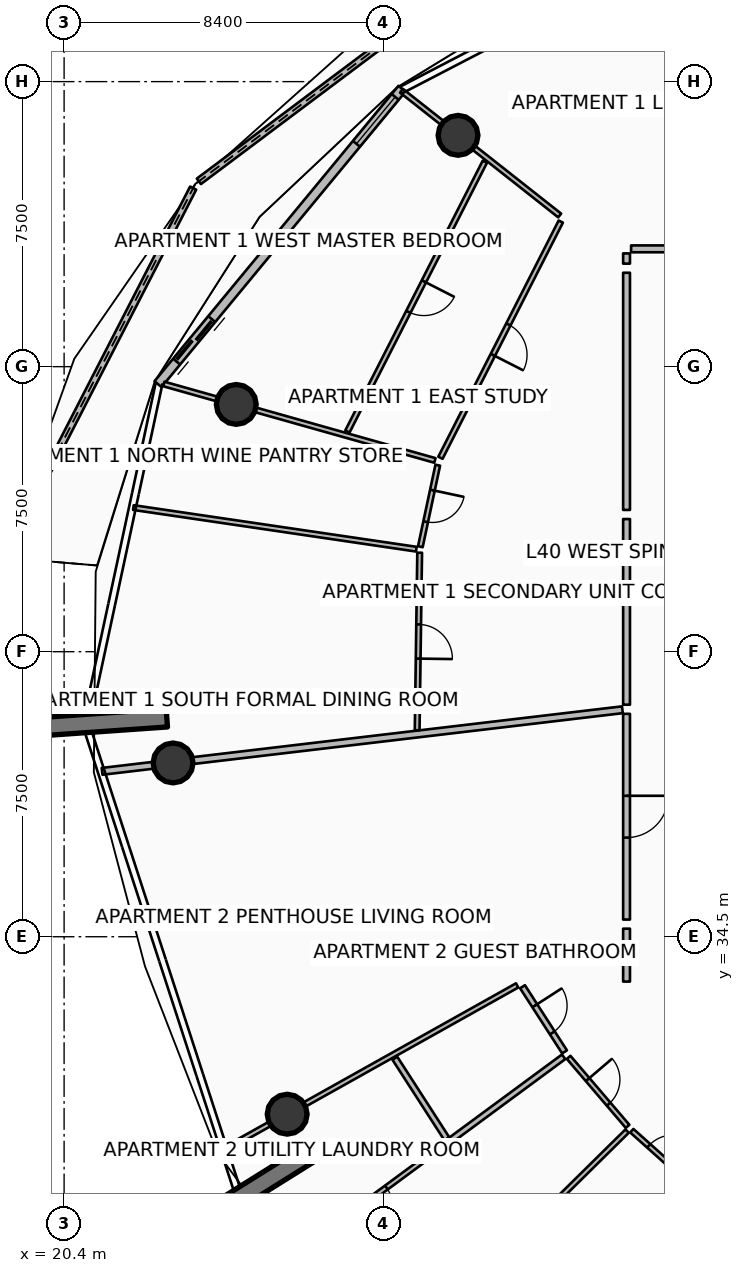
"""IFC4 building model, lengths in metres.
Left out: names, types, materials, properties, quantities, classifications, styles, units other than length and angle.
Written with IfcOpenShell. Run it as: python <this file> out.ifc"""

import sys

from ifc_helpers import new_model, si_unit, direction, frame, frame_2d, origin, origin_2d, place, context, subcontext, project, spatial, polyline, rectangle, circle, outline, extrude, element, fill, save


model = new_model("IFC4")
c1 = context("Model", 3, precision=1e-05, world=origin(), true_north=direction((0.0, 1.0)))
c2 = subcontext(c1, "Body", "Model", "MODEL_VIEW")
j1 = project(units=[si_unit("LENGTHUNIT", "METRE"), si_unit("PLANEANGLEUNIT", "RADIAN")], contexts=[c1])
p1 = place(None, origin())
s1 = spatial("IfcSite", under=j1, at=p1, CompositionType="ELEMENT")
p2 = place(p1, origin())
s2 = spatial("IfcBuilding", under=s1, at=p2, CompositionType="ELEMENT")
p3 = place(p2, frame((0.0, 0.0, 161.55)))
s3 = spatial("IfcBuildingStorey", under=s2, at=p3, CompositionType="ELEMENT", Elevation=161.55)
for number, where, z_axis, x_axis in (
    (1, (23.103, 40.259, 0.0), (0.0, 0.0, 1.0), (-0.998, -0.07, 0.0)),
    (2, (26.835, 28.774, 0.0), (0.0, 0.0, 1.0), (-0.848, -0.53, 0.0)),
):
    element("IfcWall", number, at=place(p3, frame(where, z_axis=z_axis, x_axis=x_axis)), inside=s3, PredefinedType="SOLIDWALL", context=c2, shape_type="SweptSolid", body=[
        extrude(rectangle(XDim=3.5, YDim=0.48, at=frame_2d((1.75, 0.0))), origin(), (0.0, 0.0, 1.0), 3.75),
    ])
for number, where, z_axis, x_axis in (
    (3, (30.766, 55.586, 0.0), (0.0, 0.0, 1.0), (1.0, 0.0, 0.0)),
    (4, (24.93, 48.506, 0.0), (0.0, 0.0, 1.0), (1.0, 0.0, 0.0)),
    (5, (23.267, 39.073, 0.0), (0.0, 0.0, 1.0), (1.0, 0.0, 0.0)),
    (6, (26.27, 29.831, 0.0), (0.0, 0.0, 1.0), (1.0, 0.0, 0.0)),
):
    element("IfcColumn", number, at=place(p3, frame(where, z_axis=z_axis, x_axis=x_axis)), inside=s3, PredefinedType="COLUMN", context=c2, shape_type="SweptSolid", body=[
        extrude(circle(Radius=0.525, at=origin_2d()), origin(), (0.0, 0.0, 1.0), 3.5),
    ])
p4 = place(p3, frame((32.046, 60.45, 0.0), z_axis=(0.0, 0.0, 1.0), x_axis=(-0.800078127259, -0.599895816189, 0.0)))
e7 = element("IfcWall", 7, at=p4, inside=s3, PredefinedType="PARAPET", context=c2, shape_type="SweptSolid", body=[
    extrude(outline(polyline([(0.0, 0.0), (10.124, 0.0), (10.124, 1.348), (5.062, 1.182), (0.0, 1.12), (0.0, 0.0)])), frame((0.0, 0.09, 0.0), z_axis=(0.0, -1.0, 0.0), x_axis=(1.0, 0.0, 0.0)), (0.0, 0.0, 1.0), 0.18),
])
p5 = place(p3, frame((23.796, 54.198, 0.0), z_axis=(0.0, 0.0, 1.0), x_axis=(-0.457378798552, -0.88927196888, 0.0)))
e8 = element("IfcWall", 8, at=p5, inside=s3, PredefinedType="PARAPET", context=c2, shape_type="SweptSolid", body=[
    extrude(outline(polyline([(0.0, 0.0), (10.93, 0.0), (10.93, 1.747), (5.465, 1.562), (0.0, 1.348), (0.0, 0.0)])), frame((0.0, 0.09, 0.0), z_axis=(0.0, -1.0, 0.0), x_axis=(1.0, 0.0, 0.0)), (0.0, 0.0, 1.0), 0.18),
])
p6 = place(p3, frame((29.291, 56.813, 0.0), z_axis=(0.0, 0.0, 1.0), x_axis=(-0.636771922292, -0.77105221547, 0.0)))
e9 = element("IfcWall", 9, at=p6, inside=s3, PredefinedType="SOLIDWALL", context=c2, shape_type="SweptSolid", body=[
    extrude(rectangle(XDim=10.082, YDim=0.24, at=frame_2d((5.041, 0.0))), origin(), (0.0, 0.0, 1.0), 2.45),
])
p7 = place(p6, frame((7.862, 0.0, 0.0)))
e10 = element("IfcOpeningElement", 10, at=p7, cuts=e9, PredefinedType="OPENING", context=c2, shape_type="SweptSolid", body=[
    extrude(rectangle(XDim=1.45, YDim=2.15, at=frame_2d((0.725, 1.075))), frame((0.0, 0.13, 0.0), z_axis=(0.0, -1.0, 0.0), x_axis=(1.0, 0.0, 0.0)), (0.0, 0.0, 1.0), 0.26),
])
p8 = place(p6, frame((0.28, 0.0, 0.65)))
e11 = element("IfcOpeningElement", 11, at=p8, cuts=e9, PredefinedType="OPENING", context=c2, shape_type="SweptSolid", body=[
    extrude(rectangle(XDim=1.6, YDim=1.5, at=frame_2d((0.8, 0.75))), frame((0.0, 0.13, 0.0), z_axis=(0.0, -1.0, 0.0), x_axis=(1.0, 0.0, 0.0)), (0.0, 0.0, 1.0), 0.26),
])
p9 = place(p3, frame((35.091, 40.472, 0.0), z_axis=(0.0, 0.0, 1.0), x_axis=(-0.993067434621, -0.11754603479, 0.0)))
e12 = element("IfcWall", 12, at=p9, inside=s3, PredefinedType="PARTITIONING", context=c2, shape_type="SweptSolid", body=[
    extrude(rectangle(XDim=13.787, YDim=0.18, at=frame_2d((6.894, 0.0))), origin(), (0.0, 0.0, 1.0), 2.94),
])
p10 = place(p3, frame((41.944, 52.6, 0.0), z_axis=(0.0, 0.0, 1.0), x_axis=(-1.0, 0.0, 0.0)))
e13 = element("IfcWall", 13, at=p10, inside=s3, PredefinedType="PARTITIONING", context=c2, shape_type="SweptSolid", body=[
    extrude(rectangle(XDim=6.624, YDim=0.18, at=frame_2d((3.312, 0.0))), origin(), (0.0, 0.0, 1.0), 2.94),
])
p11 = place(p10, frame((2.762, 0.0, 0.0)))
e14 = element("IfcOpeningElement", 14, at=p11, cuts=e13, PredefinedType="OPENING", context=c2, shape_type="SweptSolid", body=[
    extrude(rectangle(XDim=1.1, YDim=2.1, at=frame_2d((0.55, 1.05))), frame((0.0, 0.1, 0.0), z_axis=(0.0, -1.0, 0.0), x_axis=(1.0, 0.0, 0.0)), (0.0, 0.0, 1.0), 0.2),
])
p12 = place(p3, frame((35.2, 52.48, 0.0), z_axis=(0.0, 0.0, 1.0), x_axis=(0.0, -1.0, 0.0)))
e15 = element("IfcWall", 15, at=p12, inside=s3, PredefinedType="PARTITIONING", context=c2, shape_type="SweptSolid", body=[
    extrude(rectangle(XDim=0.269, YDim=0.18, at=frame_2d((0.135, 0.0))), origin(), (0.0, 0.0, 1.0), 2.94),
])
p13 = place(p3, frame((35.2, 51.971, 0.0), z_axis=(0.0, 0.0, 1.0), x_axis=(0.0, -1.0, 0.0)))
e16 = element("IfcWall", 16, at=p13, inside=s3, PredefinedType="PARTITIONING", context=c2, shape_type="SweptSolid", body=[
    extrude(rectangle(XDim=6.241, YDim=0.18, at=frame_2d((3.12, 0.0))), origin(), (0.0, 0.0, 1.0), 2.94),
])
p14 = place(p3, frame((33.441, 53.477, 0.0), z_axis=(0.0, 0.0, 1.0), x_axis=(-0.785319981095, 0.619090080112, 0.0)))
e17 = element("IfcWall", 17, at=p14, inside=s3, PredefinedType="PARTITIONING", context=c2, shape_type="SweptSolid", body=[
    extrude(rectangle(XDim=5.301, YDim=0.125, at=frame_2d((2.65, 0.0))), origin(), (0.0, 0.0, 1.0), 2.94),
])
p15 = place(p3, frame((33.469, 53.317, 0.0), z_axis=(0.0, 0.0, 1.0), x_axis=(-0.453977694262, -0.891013048789, 0.0)))
e18 = element("IfcWall", 18, at=p15, inside=s3, PredefinedType="PARTITIONING", context=c2, shape_type="SweptSolid", body=[
    extrude(rectangle(XDim=6.974, YDim=0.125, at=frame_2d((3.487, 0.0))), origin(), (0.0, 0.0, 1.0), 2.94),
])
p16 = place(p15, frame((3.037, 0.0, 0.0)))
e19 = element("IfcOpeningElement", 19, at=p16, cuts=e18, PredefinedType="OPENING", context=c2, shape_type="SweptSolid", body=[
    extrude(rectangle(XDim=0.9, YDim=2.08, at=frame_2d((0.45, 1.04))), frame((0.0, 0.073, 0.0), z_axis=(0.0, -1.0, 0.0), x_axis=(1.0, 0.0, 0.0)), (0.0, 0.0, 1.0), 0.145),
])
p17 = place(p3, frame((31.472, 54.892, 0.0), z_axis=(0.0, 0.0, 1.0), x_axis=(-0.453991424948, -0.89100605277, 0.0)))
e20 = element("IfcWall", 20, at=p17, inside=s3, PredefinedType="PARTITIONING", context=c2, shape_type="SweptSolid", body=[
    extrude(rectangle(XDim=7.967, YDim=0.125, at=frame_2d((3.983, 0.0))), origin(), (0.0, 0.0, 1.0), 2.94),
])
p18 = place(p17, frame((3.534, 0.0, 0.0)))
e21 = element("IfcOpeningElement", 21, at=p18, cuts=e20, PredefinedType="OPENING", context=c2, shape_type="SweptSolid", body=[
    extrude(rectangle(XDim=0.9, YDim=2.08, at=frame_2d((0.45, 1.04))), frame((0.0, 0.073, 0.0), z_axis=(0.0, -1.0, 0.0), x_axis=(1.0, 0.0, 0.0)), (0.0, 0.0, 1.0), 0.145),
])
p19 = place(p3, frame((35.2, 45.49, 0.0), z_axis=(0.0, 0.0, 1.0), x_axis=(0.0, -1.0, 0.0)))
e22 = element("IfcWall", 22, at=p19, inside=s3, PredefinedType="PARTITIONING", context=c2, shape_type="SweptSolid", body=[
    extrude(rectangle(XDim=4.885, YDim=0.18, at=frame_2d((2.442, 0.0))), origin(), (0.0, 0.0, 1.0), 2.94),
])
p20 = place(p3, frame((30.157, 47.032, 0.0), z_axis=(0.0, 0.0, 1.0), x_axis=(-0.962456736489, 0.271435131084, 0.0)))
e23 = element("IfcWall", 23, at=p20, inside=s3, PredefinedType="PARTITIONING", context=c2, shape_type="SweptSolid", body=[
    extrude(rectangle(XDim=7.412, YDim=0.125, at=frame_2d((3.706, 0.0))), origin(), (0.0, 0.0, 1.0), 2.94),
])
p21 = place(p3, frame((29.668, 44.697, 0.0), z_axis=(0.0, 0.0, 1.0), x_axis=(-0.989352403942, 0.145539756815, 0.0)))
e24 = element("IfcWall", 24, at=p21, inside=s3, PredefinedType="PARTITIONING", context=c2, shape_type="SweptSolid", body=[
    extrude(rectangle(XDim=7.525, YDim=0.125, at=frame_2d((3.763, 0.0))), origin(), (0.0, 0.0, 1.0), 2.94),
])
p22 = place(p3, frame((30.232, 46.907, 0.0), z_axis=(0.0, 0.0, 1.0), x_axis=(-0.208920938613, -0.977932534181, 0.0)))
e25 = element("IfcWall", 25, at=p22, inside=s3, PredefinedType="PARTITIONING", context=c2, shape_type="SweptSolid", body=[
    extrude(rectangle(XDim=2.193, YDim=0.125, at=frame_2d((1.097, 0.0))), origin(), (0.0, 0.0, 1.0), 2.94),
])
p23 = place(p22, frame((0.672, 0.0, 0.0)))
e26 = element("IfcOpeningElement", 26, at=p23, cuts=e25, PredefinedType="OPENING", context=c2, shape_type="SweptSolid", body=[
    extrude(rectangle(XDim=0.85, YDim=2.06, at=frame_2d((0.425, 1.03))), frame((0.0, 0.073, 0.0), z_axis=(0.0, -1.0, 0.0), x_axis=(1.0, 0.0, 0.0)), (0.0, 0.0, 1.0), 0.145),
])
p24 = place(p3, frame((29.756, 44.604, 0.0), z_axis=(0.0, 0.0, 1.0), x_axis=(-0.014161849223, -0.999899715985, 0.0)))
e27 = element("IfcWall", 27, at=p24, inside=s3, PredefinedType="PARTITIONING", context=c2, shape_type="SweptSolid", body=[
    extrude(rectangle(XDim=4.672, YDim=0.125, at=frame_2d((2.336, 0.0))), origin(), (0.0, 0.0, 1.0), 2.94),
])
p25 = place(p24, frame((1.886, 0.0, 0.0)))
e28 = element("IfcOpeningElement", 28, at=p25, cuts=e27, PredefinedType="OPENING", context=c2, shape_type="SweptSolid", body=[
    extrude(rectangle(XDim=0.9, YDim=2.08, at=frame_2d((0.45, 1.04))), frame((0.0, 0.073, 0.0), z_axis=(0.0, -1.0, 0.0), x_axis=(1.0, 0.0, 0.0)), (0.0, 0.0, 1.0), 0.145),
])
p26 = place(p3, frame((35.2, 40.365, 0.0), z_axis=(0.0, 0.0, 1.0), x_axis=(0.0, -1.0, 0.0)))
e29 = element("IfcWall", 29, at=p26, inside=s3, PredefinedType="PARTITIONING", context=c2, shape_type="SweptSolid", body=[
    extrude(rectangle(XDim=5.413, YDim=0.18, at=frame_2d((2.707, 0.0))), origin(), (0.0, 0.0, 1.0), 2.94),
])
p27 = place(p26, frame((2.156, 0.0, 0.0)))
e30 = element("IfcOpeningElement", 30, at=p27, cuts=e29, PredefinedType="OPENING", context=c2, shape_type="SweptSolid", body=[
    extrude(rectangle(XDim=1.1, YDim=2.1, at=frame_2d((0.55, 1.05))), frame((0.0, 0.1, 0.0), z_axis=(0.0, -1.0, 0.0), x_axis=(1.0, 0.0, 0.0)), (0.0, 0.0, 1.0), 0.2),
])
p28 = place(p3, frame((35.2, 34.712, 0.0), z_axis=(0.0, 0.0, 1.0), x_axis=(0.0, -1.0, 0.0)))
e31 = element("IfcWall", 31, at=p28, inside=s3, PredefinedType="PARTITIONING", context=c2, shape_type="SweptSolid", body=[
    extrude(rectangle(XDim=1.392, YDim=0.18, at=frame_2d((0.696, 0.0))), origin(), (0.0, 0.0, 1.0), 2.94),
])
p29 = place(p3, frame((32.321, 33.219, 0.0), z_axis=(0.0, 0.0, 1.0), x_axis=(-0.872493265844, -0.488626136281, 0.0)))
e32 = element("IfcWall", 32, at=p29, inside=s3, PredefinedType="PARTITIONING", context=c2, shape_type="SweptSolid", body=[
    extrude(rectangle(XDim=8.816, YDim=0.125, at=frame_2d((4.408, 0.0))), origin(), (0.0, 0.0, 1.0), 2.94),
])
p30 = place(p3, frame((32.463, 33.184, 0.0), z_axis=(0.0, 0.0, 1.0), x_axis=(0.542099612135, -0.840314233203, 0.0)))
e33 = element("IfcWall", 33, at=p30, inside=s3, PredefinedType="PARTITIONING", context=c2, shape_type="SweptSolid", body=[
    extrude(rectangle(XDim=2.04, YDim=0.15, at=frame_2d((1.02, 0.0))), origin(), (0.0, 0.0, 1.0), 2.94),
])
p31 = place(p30, frame((0.595, 0.0, 0.0)))
e34 = element("IfcOpeningElement", 34, at=p31, cuts=e33, PredefinedType="OPENING", context=c2, shape_type="SweptSolid", body=[
    extrude(rectangle(XDim=0.85, YDim=2.06, at=frame_2d((0.425, 1.03))), frame((0.0, 0.085, 0.0), z_axis=(0.0, -1.0, 0.0), x_axis=(1.0, 0.0, 0.0)), (0.0, 0.0, 1.0), 0.17),
])
p32 = place(p3, frame((29.104, 31.303, 0.0), z_axis=(0.0, 0.0, 1.0), x_axis=(0.542142313724, -0.840286684216, 0.0)))
e35 = element("IfcWall", 35, at=p32, inside=s3, PredefinedType="PARTITIONING", context=c2, shape_type="SweptSolid", body=[
    extrude(rectangle(XDim=2.521, YDim=0.15, at=frame_2d((1.26, 0.0))), origin(), (0.0, 0.0, 1.0), 2.94),
])
p33 = place(p3, frame((33.545, 31.341, 0.0), z_axis=(0.0, 0.0, 1.0), x_axis=(-0.804856199216, -0.593469880097, 0.0)))
e36 = element("IfcWall", 36, at=p33, inside=s3, PredefinedType="PARTITIONING", context=c2, shape_type="SweptSolid", body=[
    extrude(rectangle(XDim=3.72, YDim=0.15, at=frame_2d((1.86, 0.0))), origin(), (0.0, 0.0, 1.0), 2.94),
])
p34 = place(p3, frame((30.446, 29.056, 0.0), z_axis=(0.0, 0.0, 1.0), x_axis=(-0.804837038538, -0.593495864684, 0.0)))
e37 = element("IfcWall", 37, at=p34, inside=s3, PredefinedType="PARTITIONING", context=c2, shape_type="SweptSolid", body=[
    extrude(rectangle(XDim=4.741, YDim=0.125, at=frame_2d((2.371, 0.0))), origin(), (0.0, 0.0, 1.0), 2.94),
])
p35 = place(p34, frame((1.946, 0.0, 0.0)))
e38 = element("IfcOpeningElement", 38, at=p35, cuts=e37, PredefinedType="OPENING", context=c2, shape_type="SweptSolid", body=[
    extrude(rectangle(XDim=0.85, YDim=2.06, at=frame_2d((0.425, 1.03))), frame((0.0, 0.073, 0.0), z_axis=(0.0, -1.0, 0.0), x_axis=(1.0, 0.0, 0.0)), (0.0, 0.0, 1.0), 0.145),
])
p36 = place(p3, frame((35.215, 29.386, 0.0), z_axis=(0.0, 0.0, 1.0), x_axis=(-0.711845690147, -0.702335897857, 0.0)))
e39 = element("IfcWall", 39, at=p36, inside=s3, PredefinedType="PARTITIONING", context=c2, shape_type="SweptSolid", body=[
    extrude(rectangle(XDim=8.087, YDim=0.125, at=frame_2d((4.043, 0.0))), origin(), (0.0, 0.0, 1.0), 2.94),
])
p37 = place(p3, frame((33.676, 31.326, 0.0), z_axis=(0.0, 0.0, 1.0), x_axis=(0.649527713292, -0.760337918077, 0.0)))
e40 = element("IfcWall", 40, at=p37, inside=s3, PredefinedType="PARTITIONING", context=c2, shape_type="SweptSolid", body=[
    extrude(rectangle(XDim=2.388, YDim=0.125, at=frame_2d((1.194, 0.0))), origin(), (0.0, 0.0, 1.0), 2.94),
])
p38 = place(p37, frame((0.769, 0.0, 0.0)))
e41 = element("IfcOpeningElement", 41, at=p38, cuts=e40, PredefinedType="OPENING", context=c2, shape_type="SweptSolid", body=[
    extrude(rectangle(XDim=0.85, YDim=2.06, at=frame_2d((0.425, 1.03))), frame((0.0, 0.073, 0.0), z_axis=(0.0, -1.0, 0.0), x_axis=(1.0, 0.0, 0.0)), (0.0, 0.0, 1.0), 0.145),
])
p39 = place(p3, frame((35.339, 29.396, 0.0), z_axis=(0.0, 0.0, 1.0), x_axis=(0.745310033914, -0.666718046364, 0.0)))
e42 = element("IfcWall", 42, at=p39, inside=s3, PredefinedType="PARTITIONING", context=c2, shape_type="SweptSolid", body=[
    extrude(rectangle(XDim=2.044, YDim=0.125, at=frame_2d((1.022, 0.0))), origin(), (0.0, 0.0, 1.0), 2.94),
])
p40 = place(p39, frame((0.597, 0.0, 0.0)))
e43 = element("IfcOpeningElement", 43, at=p40, cuts=e42, PredefinedType="OPENING", context=c2, shape_type="SweptSolid", body=[
    extrude(rectangle(XDim=0.85, YDim=2.06, at=frame_2d((0.425, 1.03))), frame((0.0, 0.073, 0.0), z_axis=(0.0, -1.0, 0.0), x_axis=(1.0, 0.0, 0.0)), (0.0, 0.0, 1.0), 0.145),
])
p41 = place(p3, frame((36.875, 27.888, 0.0), z_axis=(0.0, 0.0, 1.0), x_axis=(-0.61910151414, -0.78531096719, 0.0)))
e44 = element("IfcWall", 44, at=p41, inside=s3, PredefinedType="PARTITIONING", context=c2, shape_type="SweptSolid", body=[
    extrude(rectangle(XDim=8.082, YDim=0.125, at=frame_2d((4.041, 0.0))), origin(), (0.0, 0.0, 1.0), 2.94),
])
p42 = place(p7, origin())
e45 = element("IfcDoor", 45, at=p42, inside=s3, OperationType="DOUBLE_DOOR_SLIDING", PredefinedType="DOOR", context=c2, shape_type="SweptSolid", body=[
    extrude(rectangle(XDim=1.45, YDim=2.15, at=frame_2d((0.725, 1.075))), frame((0.0, 0.025, 0.0), z_axis=(0.0, -1.0, 0.0), x_axis=(1.0, 0.0, 0.0)), (0.0, 0.0, 1.0), 0.05),
])
fill(e10, e45)
p43 = place(p8, origin())
e46 = element("IfcWindow", 46, at=p43, inside=s3, PartitioningType="SINGLE_PANEL", PredefinedType="WINDOW", context=c2, shape_type="SweptSolid", body=[
    extrude(rectangle(XDim=1.6, YDim=1.5, at=frame_2d((0.8, 0.75))), frame((0.0, 0.03, 0.0), z_axis=(0.0, -1.0, 0.0), x_axis=(1.0, 0.0, 0.0)), (0.0, 0.0, 1.0), 0.06),
])
fill(e11, e46)
p44 = place(p16, origin())
e47 = element("IfcDoor", 47, at=p44, inside=s3, OperationType="SINGLE_SWING_RIGHT", PredefinedType="DOOR", context=c2, shape_type="SweptSolid", body=[
    extrude(rectangle(XDim=0.9, YDim=2.08, at=frame_2d((0.45, 1.04))), frame((0.0, 0.025, 0.0), z_axis=(0.0, -1.0, 0.0), x_axis=(1.0, 0.0, 0.0)), (0.0, 0.0, 1.0), 0.05),
])
fill(e19, e47)
p45 = place(p18, origin())
e48 = element("IfcDoor", 48, at=p45, inside=s3, OperationType="SINGLE_SWING_LEFT", PredefinedType="DOOR", context=c2, shape_type="SweptSolid", body=[
    extrude(rectangle(XDim=0.9, YDim=2.08, at=frame_2d((0.45, 1.04))), frame((0.0, 0.025, 0.0), z_axis=(0.0, -1.0, 0.0), x_axis=(1.0, 0.0, 0.0)), (0.0, 0.0, 1.0), 0.05),
])
fill(e21, e48)
p46 = place(p23, origin())
e49 = element("IfcDoor", 49, at=p46, inside=s3, OperationType="SINGLE_SWING_LEFT", PredefinedType="DOOR", context=c2, shape_type="SweptSolid", body=[
    extrude(rectangle(XDim=0.85, YDim=2.06, at=frame_2d((0.425, 1.03))), frame((0.0, 0.025, 0.0), z_axis=(0.0, -1.0, 0.0), x_axis=(1.0, 0.0, 0.0)), (0.0, 0.0, 1.0), 0.05),
])
fill(e26, e49)
p47 = place(p25, origin())
e50 = element("IfcDoor", 50, at=p47, inside=s3, OperationType="SINGLE_SWING_RIGHT", PredefinedType="DOOR", context=c2, shape_type="SweptSolid", body=[
    extrude(rectangle(XDim=0.9, YDim=2.08, at=frame_2d((0.45, 1.04))), frame((0.0, 0.025, 0.0), z_axis=(0.0, -1.0, 0.0), x_axis=(1.0, 0.0, 0.0)), (0.0, 0.0, 1.0), 0.05),
])
fill(e28, e50)
p48 = place(p27, origin())
e51 = element("IfcDoor", 51, at=p48, inside=s3, OperationType="SINGLE_SWING_LEFT", PredefinedType="DOOR", context=c2, shape_type="SweptSolid", body=[
    extrude(rectangle(XDim=1.1, YDim=2.1, at=frame_2d((0.55, 1.05))), frame((0.0, 0.025, 0.0), z_axis=(0.0, -1.0, 0.0), x_axis=(1.0, 0.0, 0.0)), (0.0, 0.0, 1.0), 0.05),
])
fill(e30, e51)
p49 = place(p31, origin())
e52 = element("IfcDoor", 52, at=p49, inside=s3, OperationType="SINGLE_SWING_LEFT", PredefinedType="DOOR", context=c2, shape_type="SweptSolid", body=[
    extrude(rectangle(XDim=0.85, YDim=2.06, at=frame_2d((0.425, 1.03))), frame((0.0, 0.025, 0.0), z_axis=(0.0, -1.0, 0.0), x_axis=(1.0, 0.0, 0.0)), (0.0, 0.0, 1.0), 0.05),
])
fill(e34, e52)
p50 = place(p35, origin())
e53 = element("IfcDoor", 53, at=p50, inside=s3, OperationType="SINGLE_SWING_RIGHT", PredefinedType="DOOR", context=c2, shape_type="SweptSolid", body=[
    extrude(rectangle(XDim=0.85, YDim=2.06, at=frame_2d((0.425, 1.03))), frame((0.0, 0.025, 0.0), z_axis=(0.0, -1.0, 0.0), x_axis=(1.0, 0.0, 0.0)), (0.0, 0.0, 1.0), 0.05),
])
fill(e38, e53)
p51 = place(p38, origin())
e54 = element("IfcDoor", 54, at=p51, inside=s3, OperationType="SINGLE_SWING_LEFT", PredefinedType="DOOR", context=c2, shape_type="SweptSolid", body=[
    extrude(rectangle(XDim=0.85, YDim=2.06, at=frame_2d((0.425, 1.03))), frame((0.0, 0.025, 0.0), z_axis=(0.0, -1.0, 0.0), x_axis=(1.0, 0.0, 0.0)), (0.0, 0.0, 1.0), 0.05),
])
fill(e41, e54)
p52 = place(p40, origin())
e55 = element("IfcDoor", 55, at=p52, inside=s3, OperationType="SINGLE_SWING_RIGHT", PredefinedType="DOOR", context=c2, shape_type="SweptSolid", body=[
    extrude(rectangle(XDim=0.85, YDim=2.06, at=frame_2d((0.425, 1.03))), frame((0.0, 0.025, 0.0), z_axis=(0.0, -1.0, 0.0), x_axis=(1.0, 0.0, 0.0)), (0.0, 0.0, 1.0), 0.05),
])
fill(e43, e55)
save(model, sys.argv[1])
